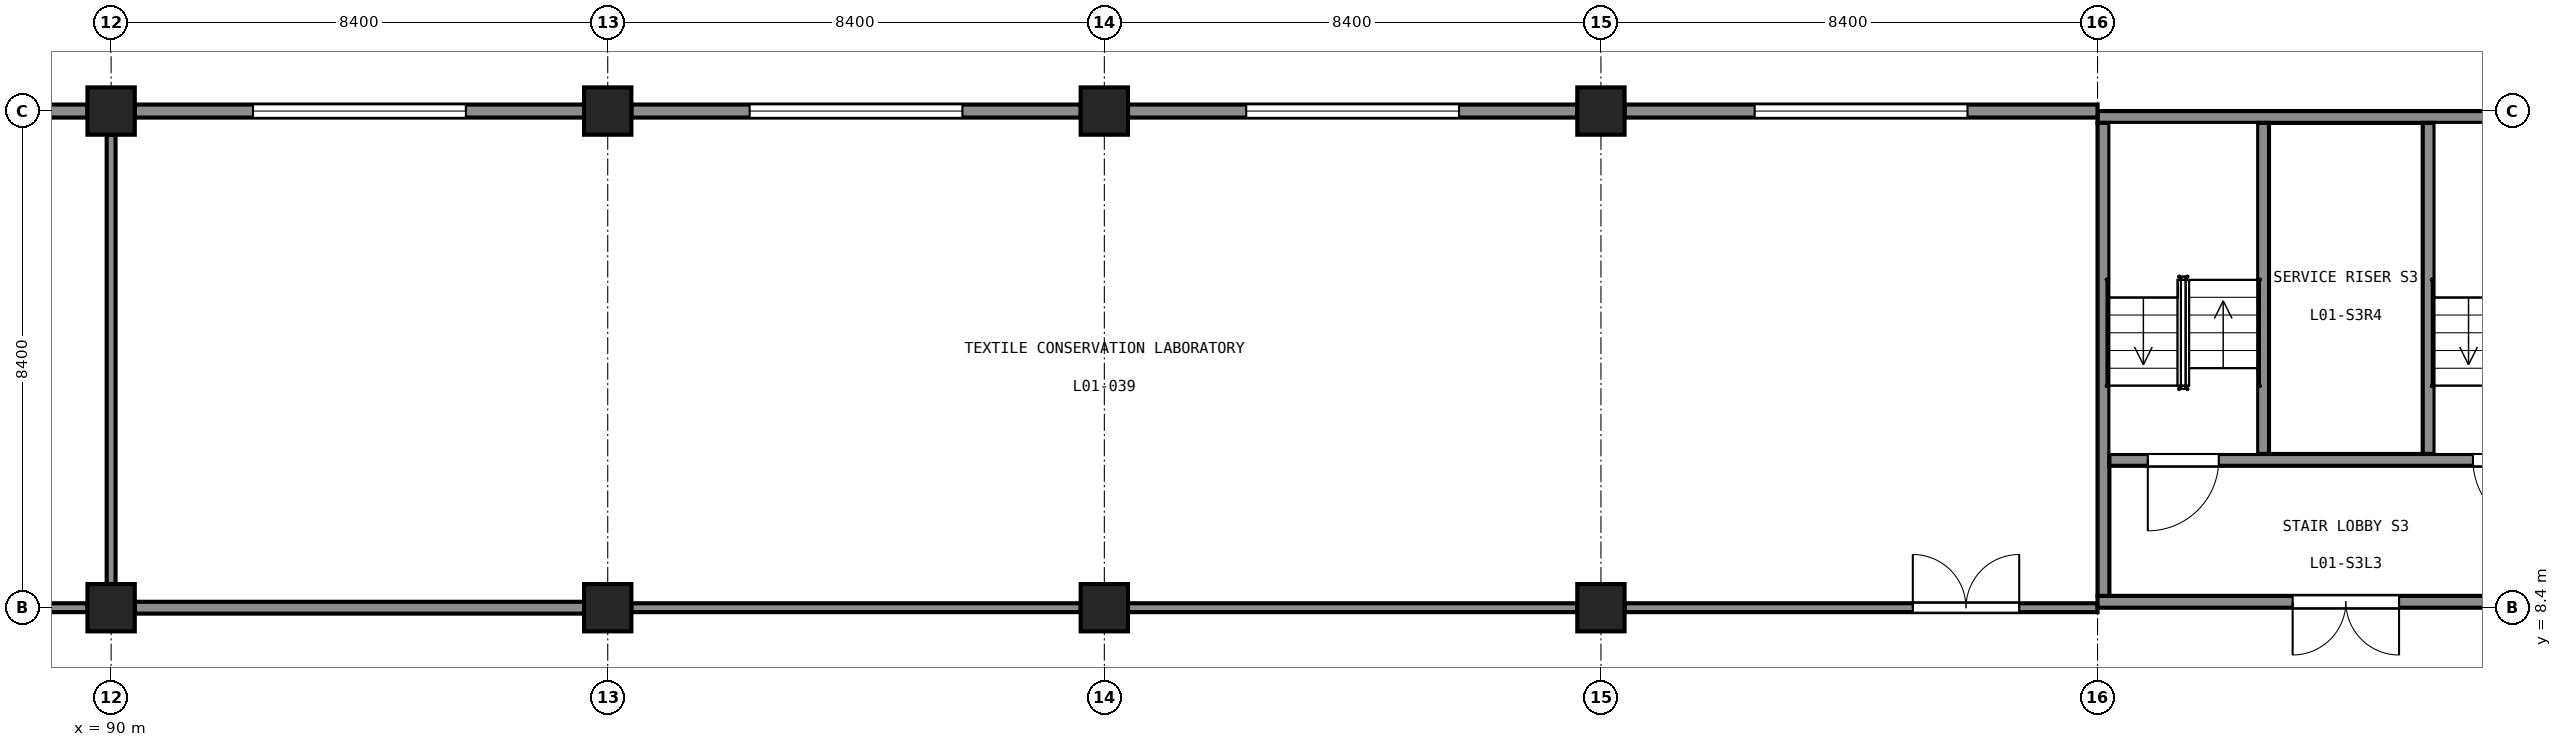
"""IFC4 building model, lengths in metres.
Left out: names, types, materials, properties, quantities, classifications, styles, units other than length and angle.
Written with IfcOpenShell. Run it as: python <this file> out.ifc"""

import sys

from ifc_helpers import new_model, si_unit, direction, frame, frame_2d, origin, origin_2d, place, context, subcontext, project, spatial, rectangle, extrude, element, fill, save


model = new_model("IFC4")
c1 = context("Model", 3, precision=1e-05, world=origin(), true_north=direction((0.0, 1.0)))
c2 = subcontext(c1, "Body", "Model", "MODEL_VIEW")
j1 = project(units=[si_unit("LENGTHUNIT", "METRE"), si_unit("PLANEANGLEUNIT", "RADIAN")], contexts=[c1])
p1 = place(None, origin())
s1 = spatial("IfcSite", under=j1, at=p1, CompositionType="ELEMENT")
p2 = place(p1, origin())
s2 = spatial("IfcBuilding", under=s1, at=p2, CompositionType="ELEMENT")
p3 = place(p2, frame((0.0, 0.0, 5.5)))
s3 = spatial("IfcBuildingStorey", under=s2, at=p3, CompositionType="ELEMENT", Elevation=5.5)
p4 = place(p3, frame((123.6, 8.5, 0.0), z_axis=(0.0, 0.0, 1.0), x_axis=(1.0, 0.0, 0.0)))
e1 = element("IfcWall", 1, at=p4, inside=s3, PredefinedType="SHEAR", context=c2, shape_type="SweptSolid", body=[
    extrude(rectangle(XDim=8.4, YDim=0.2, at=frame_2d((4.2, 0.0))), origin(), (0.0, 0.0, 1.0), 5.0),
])
p5 = place(p4, frame((3.3, 0.0, 0.0)))
e2 = element("IfcOpeningElement", 2, at=p5, cuts=e1, PredefinedType="OPENING", context=c2, shape_type="SweptSolid", body=[
    extrude(rectangle(XDim=1.8, YDim=2.1, at=frame_2d((0.9, 1.05))), frame((0.0, 0.11, 0.0), z_axis=(0.0, -1.0, 0.0), x_axis=(1.0, 0.0, 0.0)), (0.0, 0.0, 1.0), 0.22),
])
p6 = place(p3, frame((123.6, 16.7, 0.0), z_axis=(0.0, 0.0, 1.0), x_axis=(1.0, 0.0, 0.0)))
e3 = element("IfcWall", 3, at=p6, inside=s3, PredefinedType="SHEAR", context=c2, shape_type="SweptSolid", body=[
    extrude(rectangle(XDim=8.4, YDim=0.2, at=frame_2d((4.2, 0.0))), origin(), (0.0, 0.0, 1.0), 5.0),
])
p7 = place(p3, frame((123.7, 8.6, 0.0), z_axis=(0.0, 0.0, 1.0), x_axis=(0.0, 1.0, 0.0)))
e4 = element("IfcWall", 4, at=p7, inside=s3, PredefinedType="SHEAR", context=c2, shape_type="SweptSolid", body=[
    extrude(rectangle(XDim=8.0, YDim=0.2, at=frame_2d((4.0, 0.0))), origin(), (0.0, 0.0, 1.0), 5.0),
])
p8 = place(p3, frame((123.8, 10.9, 0.0), z_axis=(0.0, 0.0, 1.0), x_axis=(1.0, 0.0, 0.0)))
e5 = element("IfcWall", 5, at=p8, inside=s3, PredefinedType="SHEAR", context=c2, shape_type="SweptSolid", body=[
    extrude(rectangle(XDim=8.0, YDim=0.2, at=frame_2d((4.0, 0.0))), origin(), (0.0, 0.0, 1.0), 5.0),
])
p9 = place(p8, frame((0.65, 0.0, 0.0)))
e6 = element("IfcOpeningElement", 6, at=p9, cuts=e5, PredefinedType="OPENING", context=c2, shape_type="SweptSolid", body=[
    extrude(rectangle(XDim=1.2, YDim=2.1, at=frame_2d((0.6, 1.05))), frame((0.0, 0.11, 0.0), z_axis=(0.0, -1.0, 0.0), x_axis=(1.0, 0.0, 0.0)), (0.0, 0.0, 1.0), 0.22),
])
p10 = place(p8, frame((6.15, 0.0, 0.0)))
e7 = element("IfcOpeningElement", 7, at=p10, cuts=e5, PredefinedType="OPENING", context=c2, shape_type="SweptSolid", body=[
    extrude(rectangle(XDim=1.2, YDim=2.1, at=frame_2d((0.6, 1.05))), frame((0.0, 0.11, 0.0), z_axis=(0.0, -1.0, 0.0), x_axis=(1.0, 0.0, 0.0)), (0.0, 0.0, 1.0), 0.22),
])
for number, where, z_axis, x_axis in (
    (8, (126.4, 11.0, 0.0), (0.0, 0.0, 1.0), (0.0, 1.0, 0.0)),
    (9, (129.2, 11.0, 0.0), (0.0, 0.0, 1.0), (0.0, 1.0, 0.0)),
):
    element("IfcWall", number, at=place(p3, frame(where, z_axis=z_axis, x_axis=x_axis)), inside=s3, PredefinedType="SHEAR", context=c2, shape_type="SweptSolid", body=[
        extrude(rectangle(XDim=5.6, YDim=0.2, at=frame_2d((2.8, 0.0))), origin(), (0.0, 0.0, 1.0), 5.0),
    ])
for number, where, z_axis, x_axis in (
    (10, (90.0, 8.4, 0.0), (0.0, 0.0, 1.0), (1.0, 0.0, 0.0)),
    (11, (90.0, 16.8, 0.0), (0.0, 0.0, 1.0), (1.0, 0.0, 0.0)),
    (12, (98.4, 8.4, 0.0), (0.0, 0.0, 1.0), (1.0, 0.0, 0.0)),
    (13, (98.4, 16.8, 0.0), (0.0, 0.0, 1.0), (1.0, 0.0, 0.0)),
    (14, (106.8, 8.4, 0.0), (0.0, 0.0, 1.0), (1.0, 0.0, 0.0)),
    (15, (106.8, 16.8, 0.0), (0.0, 0.0, 1.0), (1.0, 0.0, 0.0)),
    (16, (115.2, 8.4, 0.0), (0.0, 0.0, 1.0), (1.0, 0.0, 0.0)),
    (17, (115.2, 16.8, 0.0), (0.0, 0.0, 1.0), (1.0, 0.0, 0.0)),
):
    element("IfcColumn", number, at=place(p3, frame(where, z_axis=z_axis, x_axis=x_axis)), inside=s3, PredefinedType="COLUMN", context=c2, shape_type="SweptSolid", body=[
        extrude(rectangle(XDim=0.8, YDim=0.8, at=origin_2d()), origin(), (0.0, 0.0, 1.0), 5.0),
    ])
p11 = place(p3, frame((115.6, 16.8, 0.0), z_axis=(0.0, 0.0, 1.0), x_axis=(1.0, 0.0, 0.0)))
e18 = element("IfcWall", 18, at=p11, inside=s3, PredefinedType="SOLIDWALL", context=c2, shape_type="SweptSolid", body=[
    extrude(rectangle(XDim=8.0, YDim=0.22, at=frame_2d((4.0, 0.0))), origin(), (0.0, 0.0, 1.0), 3.94),
])
p12 = place(p11, frame((2.2, 0.0, 0.9)))
e19 = element("IfcOpeningElement", 19, at=p12, cuts=e18, PredefinedType="OPENING", context=c2, shape_type="SweptSolid", body=[
    extrude(rectangle(XDim=3.6, YDim=1.5, at=frame_2d((1.8, 0.75))), frame((0.0, 0.12, 0.0), z_axis=(0.0, -1.0, 0.0), x_axis=(1.0, 0.0, 0.0)), (0.0, 0.0, 1.0), 0.24),
])
p13 = place(p3, frame((107.2, 16.8, 0.0), z_axis=(0.0, 0.0, 1.0), x_axis=(1.0, 0.0, 0.0)))
e20 = element("IfcWall", 20, at=p13, inside=s3, PredefinedType="SOLIDWALL", context=c2, shape_type="SweptSolid", body=[
    extrude(rectangle(XDim=7.6, YDim=0.22, at=frame_2d((3.8, 0.0))), origin(), (0.0, 0.0, 1.0), 3.94),
])
p14 = place(p13, frame((2.0, 0.0, 0.9)))
e21 = element("IfcOpeningElement", 21, at=p14, cuts=e20, PredefinedType="OPENING", context=c2, shape_type="SweptSolid", body=[
    extrude(rectangle(XDim=3.6, YDim=1.5, at=frame_2d((1.8, 0.75))), frame((0.0, 0.12, 0.0), z_axis=(0.0, -1.0, 0.0), x_axis=(1.0, 0.0, 0.0)), (0.0, 0.0, 1.0), 0.24),
])
p15 = place(p3, frame((98.8, 16.8, 0.0), z_axis=(0.0, 0.0, 1.0), x_axis=(1.0, 0.0, 0.0)))
e22 = element("IfcWall", 22, at=p15, inside=s3, PredefinedType="SOLIDWALL", context=c2, shape_type="SweptSolid", body=[
    extrude(rectangle(XDim=7.6, YDim=0.22, at=frame_2d((3.8, 0.0))), origin(), (0.0, 0.0, 1.0), 3.94),
])
p16 = place(p15, frame((2.0, 0.0, 0.9)))
e23 = element("IfcOpeningElement", 23, at=p16, cuts=e22, PredefinedType="OPENING", context=c2, shape_type="SweptSolid", body=[
    extrude(rectangle(XDim=3.6, YDim=1.5, at=frame_2d((1.8, 0.75))), frame((0.0, 0.12, 0.0), z_axis=(0.0, -1.0, 0.0), x_axis=(1.0, 0.0, 0.0)), (0.0, 0.0, 1.0), 0.24),
])
p17 = place(p3, frame((90.4, 16.8, 0.0), z_axis=(0.0, 0.0, 1.0), x_axis=(1.0, 0.0, 0.0)))
e24 = element("IfcWall", 24, at=p17, inside=s3, PredefinedType="SOLIDWALL", context=c2, shape_type="SweptSolid", body=[
    extrude(rectangle(XDim=7.6, YDim=0.22, at=frame_2d((3.8, 0.0))), origin(), (0.0, 0.0, 1.0), 3.94),
])
p18 = place(p17, frame((2.0, 0.0, 0.9)))
e25 = element("IfcOpeningElement", 25, at=p18, cuts=e24, PredefinedType="OPENING", context=c2, shape_type="SweptSolid", body=[
    extrude(rectangle(XDim=3.6, YDim=1.5, at=frame_2d((1.8, 0.75))), frame((0.0, 0.12, 0.0), z_axis=(0.0, -1.0, 0.0), x_axis=(1.0, 0.0, 0.0)), (0.0, 0.0, 1.0), 0.24),
])
p19 = place(p3, frame((82.0, 16.8, 0.0), z_axis=(0.0, 0.0, 1.0), x_axis=(1.0, 0.0, 0.0)))
e26 = element("IfcWall", 26, at=p19, inside=s3, PredefinedType="SOLIDWALL", context=c2, shape_type="SweptSolid", body=[
    extrude(rectangle(XDim=7.6, YDim=0.22, at=frame_2d((3.8, 0.0))), origin(), (0.0, 0.0, 1.0), 3.94),
])
p20 = place(p19, frame((2.0, 0.0, 0.9)))
e27 = element("IfcOpeningElement", 27, at=p20, cuts=e26, PredefinedType="OPENING", context=c2, shape_type="SweptSolid", body=[
    extrude(rectangle(XDim=3.6, YDim=1.5, at=frame_2d((1.8, 0.75))), frame((0.0, 0.12, 0.0), z_axis=(0.0, -1.0, 0.0), x_axis=(1.0, 0.0, 0.0)), (0.0, 0.0, 1.0), 0.24),
])
p21 = place(p3, frame((90.0, 8.8, 0.0), z_axis=(0.0, 0.0, 1.0), x_axis=(0.0, 1.0, 0.0)))
e28 = element("IfcWall", 28, at=p21, inside=s3, PredefinedType="PARTITIONING", context=c2, shape_type="SweptSolid", body=[
    extrude(rectangle(XDim=7.6, YDim=0.15, at=frame_2d((3.8, 0.0))), origin(), (0.0, 0.0, 1.0), 3.9),
])
p22 = place(p3, frame((82.0, 8.4, 0.0), z_axis=(0.0, 0.0, 1.0), x_axis=(1.0, 0.0, 0.0)))
e29 = element("IfcWall", 29, at=p22, inside=s3, PredefinedType="PARTITIONING", context=c2, shape_type="SweptSolid", body=[
    extrude(rectangle(XDim=7.6, YDim=0.15, at=frame_2d((3.8, 0.0))), origin(), (0.0, 0.0, 1.0), 3.9),
])
p23 = place(p3, frame((98.8, 8.4, 0.0), z_axis=(0.0, 0.0, 1.0), x_axis=(1.0, 0.0, 0.0)))
e30 = element("IfcWall", 30, at=p23, inside=s3, PredefinedType="PARTITIONING", context=c2, shape_type="SweptSolid", body=[
    extrude(rectangle(XDim=7.6, YDim=0.15, at=frame_2d((3.8, 0.0))), origin(), (0.0, 0.0, 1.0), 3.9),
])
p24 = place(p3, frame((107.2, 8.4, 0.0), z_axis=(0.0, 0.0, 1.0), x_axis=(1.0, 0.0, 0.0)))
e31 = element("IfcWall", 31, at=p24, inside=s3, PredefinedType="PARTITIONING", context=c2, shape_type="SweptSolid", body=[
    extrude(rectangle(XDim=7.6, YDim=0.15, at=frame_2d((3.8, 0.0))), origin(), (0.0, 0.0, 1.0), 3.9),
])
p25 = place(p3, frame((115.6, 8.4, 0.0), z_axis=(0.0, 0.0, 1.0), x_axis=(1.0, 0.0, 0.0)))
e32 = element("IfcWall", 32, at=p25, inside=s3, PredefinedType="PARTITIONING", context=c2, shape_type="SweptSolid", body=[
    extrude(rectangle(XDim=8.0, YDim=0.15, at=frame_2d((4.0, 0.0))), origin(), (0.0, 0.0, 1.0), 3.9),
])
p26 = place(p25, frame((4.875, 0.0, 0.0)))
e33 = element("IfcOpeningElement", 33, at=p26, cuts=e32, PredefinedType="OPENING", context=c2, shape_type="SweptSolid", body=[
    extrude(rectangle(XDim=1.8, YDim=2.1, at=frame_2d((0.9, 1.05))), frame((0.0, 0.085, 0.0), z_axis=(0.0, -1.0, 0.0), x_axis=(1.0, 0.0, 0.0)), (0.0, 0.0, 1.0), 0.17),
])
p27 = place(p3, frame((90.4, 8.4, 0.0), z_axis=(0.0, 0.0, 1.0), x_axis=(1.0, 0.0, 0.0)))
e34 = element("IfcWall", 34, at=p27, inside=s3, PredefinedType="PARTITIONING", context=c2, shape_type="SweptSolid", body=[
    extrude(rectangle(XDim=7.6, YDim=0.2, at=frame_2d((3.8, 0.0))), origin(), (0.0, 0.0, 1.0), 3.9),
])
p28 = place(p12, origin())
e35 = element("IfcWindow", 35, at=p28, inside=s3, PartitioningType="DOUBLE_PANEL_VERTICAL", PredefinedType="WINDOW", context=c2, shape_type="SweptSolid", body=[
    extrude(rectangle(XDim=3.6, YDim=1.5, at=frame_2d((1.8, 0.75))), frame((0.0, -0.03, 0.0), z_axis=(0.0, -1.0, 0.0), x_axis=(1.0, 0.0, 0.0)), (0.0, 0.0, 1.0), 0.06),
])
fill(e19, e35)
p29 = place(p14, origin())
e36 = element("IfcWindow", 36, at=p29, inside=s3, PartitioningType="DOUBLE_PANEL_VERTICAL", PredefinedType="WINDOW", context=c2, shape_type="SweptSolid", body=[
    extrude(rectangle(XDim=3.6, YDim=1.5, at=frame_2d((1.8, 0.75))), frame((0.0, -0.03, 0.0), z_axis=(0.0, -1.0, 0.0), x_axis=(1.0, 0.0, 0.0)), (0.0, 0.0, 1.0), 0.06),
])
fill(e21, e36)
p30 = place(p16, origin())
e37 = element("IfcWindow", 37, at=p30, inside=s3, PartitioningType="DOUBLE_PANEL_VERTICAL", PredefinedType="WINDOW", context=c2, shape_type="SweptSolid", body=[
    extrude(rectangle(XDim=3.6, YDim=1.5, at=frame_2d((1.8, 0.75))), frame((0.0, -0.03, 0.0), z_axis=(0.0, -1.0, 0.0), x_axis=(1.0, 0.0, 0.0)), (0.0, 0.0, 1.0), 0.06),
])
fill(e23, e37)
p31 = place(p18, origin())
e38 = element("IfcWindow", 38, at=p31, inside=s3, PartitioningType="DOUBLE_PANEL_VERTICAL", PredefinedType="WINDOW", context=c2, shape_type="SweptSolid", body=[
    extrude(rectangle(XDim=3.6, YDim=1.5, at=frame_2d((1.8, 0.75))), frame((0.0, -0.03, 0.0), z_axis=(0.0, -1.0, 0.0), x_axis=(1.0, 0.0, 0.0)), (0.0, 0.0, 1.0), 0.06),
])
fill(e25, e38)
p32 = place(p26, origin())
e39 = element("IfcDoor", 39, at=p32, inside=s3, OperationType="DOUBLE_DOOR_SINGLE_SWING", PredefinedType="DOOR", context=c2, shape_type="SweptSolid", body=[
    extrude(rectangle(XDim=1.8, YDim=2.1, at=frame_2d((0.9, 1.05))), frame((0.0, 0.025, 0.0), z_axis=(0.0, -1.0, 0.0), x_axis=(1.0, 0.0, 0.0)), (0.0, 0.0, 1.0), 0.05),
])
fill(e33, e39)
p33 = place(p5, origin())
e40 = element("IfcDoor", 40, at=p33, inside=s3, OperationType="DOUBLE_DOOR_SINGLE_SWING", PredefinedType="DOOR", context=c2, shape_type="SweptSolid", body=[
    extrude(rectangle(XDim=1.8, YDim=2.1, at=frame_2d((0.9, 1.05))), frame((0.0, 0.025, 0.0), z_axis=(0.0, -1.0, 0.0), x_axis=(1.0, 0.0, 0.0)), (0.0, 0.0, 1.0), 0.05),
])
fill(e2, e40)
p34 = place(p9, origin())
e41 = element("IfcDoor", 41, at=p34, inside=s3, OperationType="SINGLE_SWING_LEFT", PredefinedType="DOOR", context=c2, shape_type="SweptSolid", body=[
    extrude(rectangle(XDim=1.2, YDim=2.1, at=frame_2d((0.6, 1.05))), frame((0.0, 0.025, 0.0), z_axis=(0.0, -1.0, 0.0), x_axis=(1.0, 0.0, 0.0)), (0.0, 0.0, 1.0), 0.05),
])
fill(e6, e41)
p35 = place(p10, origin())
e42 = element("IfcDoor", 42, at=p35, inside=s3, OperationType="SINGLE_SWING_RIGHT", PredefinedType="DOOR", context=c2, shape_type="SweptSolid", body=[
    extrude(rectangle(XDim=1.2, YDim=2.1, at=frame_2d((0.6, 1.05))), frame((0.0, 0.025, 0.0), z_axis=(0.0, -1.0, 0.0), x_axis=(1.0, 0.0, 0.0)), (0.0, 0.0, 1.0), 0.05),
])
fill(e7, e42)
save(model, sys.argv[1])
